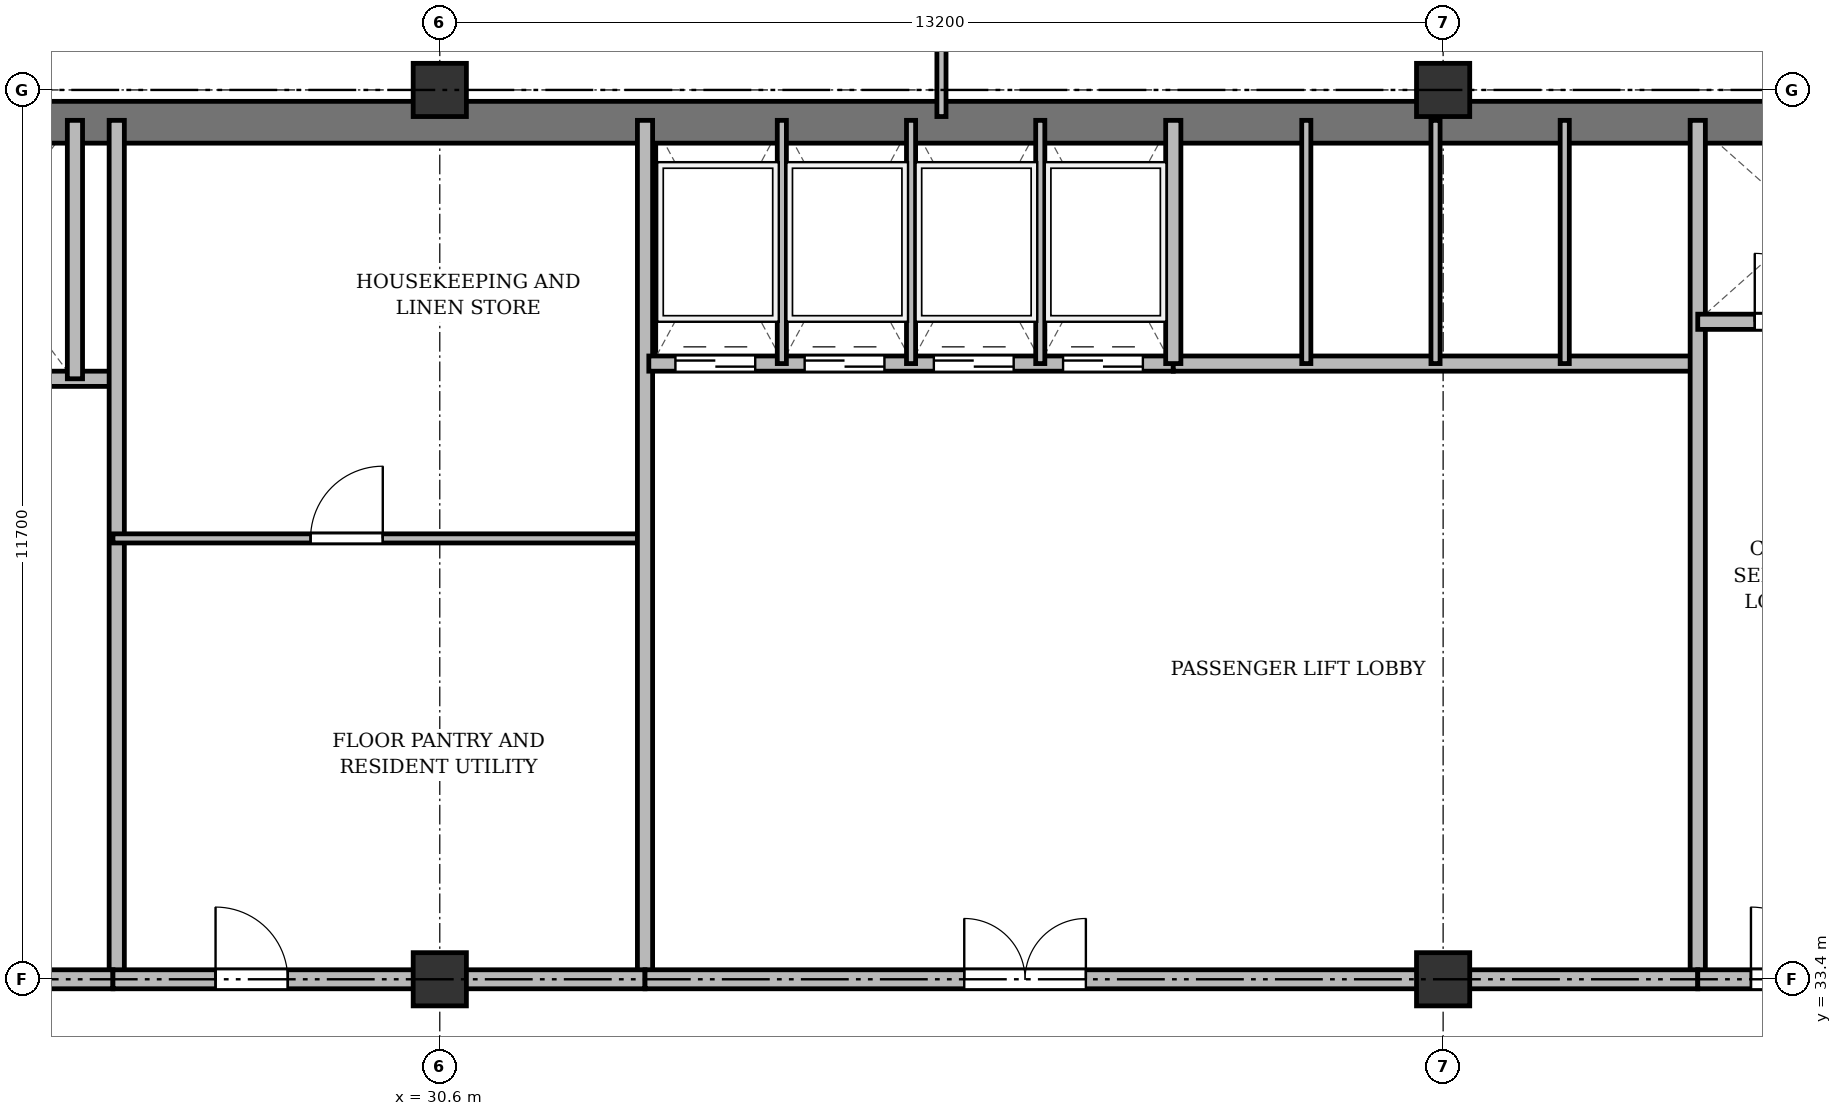
"""IFC4 building model, lengths in metres.
Left out: names, types, materials, properties, quantities, classifications, styles, units other than length and angle.
Written with IfcOpenShell. Run it as: python <this file> out.ifc"""

import sys

from ifc_helpers import new_model, si_unit, direction, frame, frame_2d, origin, origin_2d, place, context, subcontext, project, spatial, rectangle, extrude, source, transform, mapped, element, fill, save


model = new_model("IFC4")
c1 = context("Model", 3, precision=1e-05, world=origin(), true_north=direction((0.0, 1.0)))
c2 = subcontext(c1, "Body", "Model", "MODEL_VIEW")
j1 = project(units=[si_unit("LENGTHUNIT", "METRE"), si_unit("PLANEANGLEUNIT", "RADIAN")], contexts=[c1])
p1 = place(None, origin())
s1 = spatial("IfcSite", under=j1, at=p1, CompositionType="ELEMENT")
p2 = place(p1, origin())
s2 = spatial("IfcBuilding", under=s1, at=p2, CompositionType="ELEMENT")
p3 = place(p2, frame((0.0, 0.0, 153.7)))
s3 = spatial("IfcBuildingStorey", under=s2, at=p3, CompositionType="ELEMENT", Elevation=153.7)
m1 = source(origin(), c2, "Body", "SweptSolid", [
    extrude(rectangle(XDim=0.7, YDim=0.7, at=origin_2d()), origin(), (0.0, 0.0, 1.0), 3.6),
])
for number, where, z_axis, x_axis in (
    (1, (30.6, 33.4, 0.0), (0.0, 0.0, 1.0), (1.0, 0.0, 0.0)),
    (2, (30.6, 45.1, 0.0), (0.0, 0.0, 1.0), (1.0, 0.0, 0.0)),
    (3, (43.8, 33.4, 0.0), (0.0, 0.0, 1.0), (1.0, 0.0, 0.0)),
    (4, (43.8, 45.1, 0.0), (0.0, 0.0, 1.0), (1.0, 0.0, 0.0)),
):
    element("IfcColumn", number, at=place(p3, frame(where, z_axis=z_axis, x_axis=x_axis)), inside=s3, PredefinedType="COLUMN", context=c2, shape_type="MappedRepresentation", body=[
        mapped(m1, transform((0.0, 0.0, 0.0), x_axis=(1.0, 0.0, 0.0), y_axis=(0.0, 1.0, 0.0), z_axis=(0.0, 0.0, 1.0), scale=1.0)),
    ])
p4 = place(p3, frame((15.65, 44.675, 0.0), z_axis=(0.0, 0.0, 1.0), x_axis=(1.0, 0.0, 0.0)))
e5 = element("IfcWall", 5, at=p4, inside=s3, PredefinedType="SHEAR", context=c2, shape_type="SweptSolid", body=[
    extrude(rectangle(XDim=43.1, YDim=0.55, at=frame_2d((21.55, 0.0))), origin(), (0.0, 0.0, 1.0), 3.35),
])
p5 = place(p3, frame((19.55, 41.3, 0.0), z_axis=(0.0, 0.0, 1.0), x_axis=(1.0, 0.0, 0.0)))
e6 = element("IfcWall", 6, at=p5, inside=s3, PredefinedType="SOLIDWALL", context=c2, shape_type="SweptSolid", body=[
    extrude(rectangle(XDim=6.75, YDim=0.2, at=frame_2d((3.375, 0.0))), origin(), (0.0, 0.0, 1.0), 3.35),
])
p6 = place(p5, frame((1.7, 0.0, 0.0)))
e7 = element("IfcOpeningElement", 7, at=p6, cuts=e6, PredefinedType="OPENING", context=c2, shape_type="SweptSolid", body=[
    extrude(rectangle(XDim=1.1, YDim=2.15, at=frame_2d((0.55, 1.075))), frame((0.0, 0.11, 0.0), z_axis=(0.0, -1.0, 0.0), x_axis=(1.0, 0.0, 0.0)), (0.0, 0.0, 1.0), 0.22),
])
p7 = place(p5, frame((4.4, 0.0, 0.0)))
e8 = element("IfcOpeningElement", 8, at=p7, cuts=e6, PredefinedType="OPENING", context=c2, shape_type="SweptSolid", body=[
    extrude(rectangle(XDim=1.1, YDim=2.15, at=frame_2d((0.55, 1.075))), frame((0.0, 0.11, 0.0), z_axis=(0.0, -1.0, 0.0), x_axis=(1.0, 0.0, 0.0)), (0.0, 0.0, 1.0), 0.22),
])
p8 = place(p3, frame((25.8, 41.3, 0.0), z_axis=(0.0, 0.0, 1.0), x_axis=(0.0, 1.0, 0.0)))
e9 = element("IfcWall", 9, at=p8, inside=s3, PredefinedType="SOLIDWALL", context=c2, shape_type="SweptSolid", body=[
    extrude(rectangle(XDim=3.4, YDim=0.2, at=frame_2d((1.7, 0.0))), origin(), (0.0, 0.0, 1.0), 3.35),
])
p9 = place(p3, frame((26.35, 33.4, 0.0), z_axis=(0.0, 0.0, 1.0), x_axis=(0.0, 1.0, 0.0)))
e10 = element("IfcWall", 10, at=p9, inside=s3, PredefinedType="SOLIDWALL", context=c2, shape_type="SweptSolid", body=[
    extrude(rectangle(XDim=11.3, YDim=0.2, at=frame_2d((5.65, 0.0))), origin(), (0.0, 0.0, 1.0), 2.75),
])
p10 = place(p3, frame((19.5, 33.4, 0.0), z_axis=(0.0, 0.0, 1.0), x_axis=(1.0, 0.0, 0.0)))
e11 = element("IfcWall", 11, at=p10, inside=s3, PredefinedType="PARTITIONING", context=c2, shape_type="SweptSolid", body=[
    extrude(rectangle(XDim=6.8, YDim=0.25, at=frame_2d((3.4, 0.0))), origin(), (0.0, 0.0, 1.0), 2.75),
])
p11 = place(p10, frame((0.75, 0.0, 0.0)))
e12 = element("IfcOpeningElement", 12, at=p11, cuts=e11, PredefinedType="OPENING", context=c2, shape_type="SweptSolid", body=[
    extrude(rectangle(XDim=1.6, YDim=2.2, at=frame_2d((0.8, 1.1))), frame((0.0, 0.135, 0.0), z_axis=(0.0, -1.0, 0.0), x_axis=(1.0, 0.0, 0.0)), (0.0, 0.0, 1.0), 0.27),
])
p12 = place(p3, frame((26.3, 39.2, 0.0), z_axis=(0.0, 0.0, 1.0), x_axis=(1.0, 0.0, 0.0)))
e13 = element("IfcWall", 13, at=p12, inside=s3, PredefinedType="PARTITIONING", context=c2, shape_type="SweptSolid", body=[
    extrude(rectangle(XDim=7.0, YDim=0.12, at=frame_2d((3.5, 0.0))), origin(), (0.0, 0.0, 1.0), 2.85),
])
p13 = place(p12, frame((2.6, 0.0, 0.0)))
e14 = element("IfcOpeningElement", 14, at=p13, cuts=e13, PredefinedType="OPENING", context=c2, shape_type="SweptSolid", body=[
    extrude(rectangle(XDim=0.95, YDim=2.15, at=frame_2d((0.475, 1.075))), frame((0.0, 0.07, 0.0), z_axis=(0.0, -1.0, 0.0), x_axis=(1.0, 0.0, 0.0)), (0.0, 0.0, 1.0), 0.14),
])
p14 = place(p3, frame((33.3, 33.4, 0.0), z_axis=(0.0, 0.0, 1.0), x_axis=(0.0, 1.0, 0.0)))
e15 = element("IfcWall", 15, at=p14, inside=s3, PredefinedType="SOLIDWALL", context=c2, shape_type="SweptSolid", body=[
    extrude(rectangle(XDim=11.3, YDim=0.2, at=frame_2d((5.65, 0.0))), origin(), (0.0, 0.0, 1.0), 2.75),
])
p15 = place(p3, frame((33.35, 41.5, 0.0), z_axis=(0.0, 0.0, 1.0), x_axis=(1.0, 0.0, 0.0)))
e16 = element("IfcWall", 16, at=p15, inside=s3, PredefinedType="SOLIDWALL", context=c2, shape_type="SweptSolid", body=[
    extrude(rectangle(XDim=6.9, YDim=0.2, at=frame_2d((3.45, 0.0))), origin(), (0.0, 0.0, 1.0), 3.35),
])
p16 = place(p15, frame((0.35, 0.0, 0.0)))
e17 = element("IfcOpeningElement", 17, at=p16, cuts=e16, PredefinedType="OPENING", context=c2, shape_type="SweptSolid", body=[
    extrude(rectangle(XDim=1.05, YDim=2.15, at=frame_2d((0.525, 1.075))), frame((0.0, 0.11, 0.0), z_axis=(0.0, -1.0, 0.0), x_axis=(1.0, 0.0, 0.0)), (0.0, 0.0, 1.0), 0.22),
])
p17 = place(p15, frame((2.05, 0.0, 0.0)))
e18 = element("IfcOpeningElement", 18, at=p17, cuts=e16, PredefinedType="OPENING", context=c2, shape_type="SweptSolid", body=[
    extrude(rectangle(XDim=1.05, YDim=2.15, at=frame_2d((0.525, 1.075))), frame((0.0, 0.11, 0.0), z_axis=(0.0, -1.0, 0.0), x_axis=(1.0, 0.0, 0.0)), (0.0, 0.0, 1.0), 0.22),
])
p18 = place(p15, frame((3.75, 0.0, 0.0)))
e19 = element("IfcOpeningElement", 19, at=p18, cuts=e16, PredefinedType="OPENING", context=c2, shape_type="SweptSolid", body=[
    extrude(rectangle(XDim=1.05, YDim=2.15, at=frame_2d((0.525, 1.075))), frame((0.0, 0.11, 0.0), z_axis=(0.0, -1.0, 0.0), x_axis=(1.0, 0.0, 0.0)), (0.0, 0.0, 1.0), 0.22),
])
p19 = place(p15, frame((5.45, 0.0, 0.0)))
e20 = element("IfcOpeningElement", 20, at=p19, cuts=e16, PredefinedType="OPENING", context=c2, shape_type="SweptSolid", body=[
    extrude(rectangle(XDim=1.05, YDim=2.15, at=frame_2d((0.525, 1.075))), frame((0.0, 0.11, 0.0), z_axis=(0.0, -1.0, 0.0), x_axis=(1.0, 0.0, 0.0)), (0.0, 0.0, 1.0), 0.22),
])
for number, where, z_axis, x_axis in (
    (21, (35.1, 41.5, 0.0), (0.0, 0.0, 1.0), (0.0, 1.0, 0.0)),
    (22, (36.8, 41.5, 0.0), (0.0, 0.0, 1.0), (0.0, 1.0, 0.0)),
    (23, (38.5, 41.5, 0.0), (0.0, 0.0, 1.0), (0.0, 1.0, 0.0)),
):
    element("IfcWall", number, at=place(p3, frame(where, z_axis=z_axis, x_axis=x_axis)), inside=s3, PredefinedType="PARTITIONING", context=c2, shape_type="SweptSolid", body=[
        extrude(rectangle(XDim=3.2, YDim=0.12, at=frame_2d((1.6, 0.0))), origin(), (0.0, 0.0, 1.0), 3.35),
    ])
p20 = place(p3, frame((40.25, 41.5, 0.0), z_axis=(0.0, 0.0, 1.0), x_axis=(1.0, 0.0, 0.0)))
e24 = element("IfcWall", 24, at=p20, inside=s3, PredefinedType="SOLIDWALL", context=c2, shape_type="SweptSolid", body=[
    extrude(rectangle(XDim=6.9, YDim=0.2, at=frame_2d((3.45, 0.0))), origin(), (0.0, 0.0, 1.0), 2.85),
])
p21 = place(p3, frame((40.25, 41.5, 0.0), z_axis=(0.0, 0.0, 1.0), x_axis=(0.0, 1.0, 0.0)))
e25 = element("IfcWall", 25, at=p21, inside=s3, PredefinedType="SOLIDWALL", context=c2, shape_type="SweptSolid", body=[
    extrude(rectangle(XDim=3.2, YDim=0.2, at=frame_2d((1.6, 0.0))), origin(), (0.0, 0.0, 1.0), 3.35),
])
p22 = place(p3, frame((42.0, 41.5, 0.0), z_axis=(0.0, 0.0, 1.0), x_axis=(0.0, 1.0, 0.0)))
e26 = element("IfcWall", 26, at=p22, inside=s3, PredefinedType="PARTITIONING", context=c2, shape_type="SweptSolid", body=[
    extrude(rectangle(XDim=3.2, YDim=0.12, at=frame_2d((1.6, 0.0))), origin(), (0.0, 0.0, 1.0), 3.35),
])
p23 = place(p3, frame((43.7, 41.5, 0.0), z_axis=(0.0, 0.0, 1.0), x_axis=(0.0, 1.0, 0.0)))
e27 = element("IfcWall", 27, at=p23, inside=s3, PredefinedType="PARTITIONING", context=c2, shape_type="SweptSolid", body=[
    extrude(rectangle(XDim=3.2, YDim=0.12, at=frame_2d((1.6, 0.0))), origin(), (0.0, 0.0, 1.0), 2.85),
])
p24 = place(p3, frame((45.4, 41.5, 0.0), z_axis=(0.0, 0.0, 1.0), x_axis=(0.0, 1.0, 0.0)))
e28 = element("IfcWall", 28, at=p24, inside=s3, PredefinedType="PARTITIONING", context=c2, shape_type="SweptSolid", body=[
    extrude(rectangle(XDim=3.2, YDim=0.12, at=frame_2d((1.6, 0.0))), origin(), (0.0, 0.0, 1.0), 3.35),
])
p25 = place(p3, frame((47.15, 33.4, 0.0), z_axis=(0.0, 0.0, 1.0), x_axis=(0.0, 1.0, 0.0)))
e29 = element("IfcWall", 29, at=p25, inside=s3, PredefinedType="SOLIDWALL", context=c2, shape_type="SweptSolid", body=[
    extrude(rectangle(XDim=11.3, YDim=0.2, at=frame_2d((5.65, 0.0))), origin(), (0.0, 0.0, 1.0), 2.75),
])
p26 = place(p3, frame((26.3, 33.4, 0.0), z_axis=(0.0, 0.0, 1.0), x_axis=(1.0, 0.0, 0.0)))
e30 = element("IfcWall", 30, at=p26, inside=s3, PredefinedType="PARTITIONING", context=c2, shape_type="SweptSolid", body=[
    extrude(rectangle(XDim=7.0, YDim=0.25, at=frame_2d((3.5, 0.0))), origin(), (0.0, 0.0, 1.0), 2.75),
])
p27 = place(p26, frame((1.35, 0.0, 0.0)))
e31 = element("IfcOpeningElement", 31, at=p27, cuts=e30, PredefinedType="OPENING", context=c2, shape_type="SweptSolid", body=[
    extrude(rectangle(XDim=0.95, YDim=2.15, at=frame_2d((0.475, 1.075))), frame((0.0, 0.135, 0.0), z_axis=(0.0, -1.0, 0.0), x_axis=(1.0, 0.0, 0.0)), (0.0, 0.0, 1.0), 0.27),
])
p28 = place(p3, frame((33.3, 33.4, 0.0), z_axis=(0.0, 0.0, 1.0), x_axis=(1.0, 0.0, 0.0)))
e32 = element("IfcWall", 32, at=p28, inside=s3, PredefinedType="PARTITIONING", context=c2, shape_type="SweptSolid", body=[
    extrude(rectangle(XDim=13.85, YDim=0.25, at=frame_2d((6.925, 0.0))), origin(), (0.0, 0.0, 1.0), 2.75),
])
p29 = place(p28, frame((4.2, 0.0, 0.0)))
e33 = element("IfcOpeningElement", 33, at=p29, cuts=e32, PredefinedType="OPENING", context=c2, shape_type="SweptSolid", body=[
    extrude(rectangle(XDim=1.6, YDim=2.2, at=frame_2d((0.8, 1.1))), frame((0.0, 0.135, 0.0), z_axis=(0.0, -1.0, 0.0), x_axis=(1.0, 0.0, 0.0)), (0.0, 0.0, 1.0), 0.27),
])
p30 = place(p3, frame((47.15, 42.05, 0.0), z_axis=(0.0, 0.0, 1.0), x_axis=(1.0, 0.0, 0.0)))
e34 = element("IfcWall", 34, at=p30, inside=s3, PredefinedType="SOLIDWALL", context=c2, shape_type="SweptSolid", body=[
    extrude(rectangle(XDim=7.85, YDim=0.2, at=frame_2d((3.925, 0.0))), origin(), (0.0, 0.0, 1.0), 2.85),
])
p31 = place(p30, frame((0.75, 0.0, 0.0)))
e35 = element("IfcOpeningElement", 35, at=p31, cuts=e34, PredefinedType="OPENING", context=c2, shape_type="SweptSolid", body=[
    extrude(rectangle(XDim=0.9, YDim=2.1, at=frame_2d((0.45, 1.05))), frame((0.0, 0.11, 0.0), z_axis=(0.0, -1.0, 0.0), x_axis=(1.0, 0.0, 0.0)), (0.0, 0.0, 1.0), 0.22),
])
p32 = place(p30, frame((3.85, 0.0, 0.0)))
e36 = element("IfcOpeningElement", 36, at=p32, cuts=e34, PredefinedType="OPENING", context=c2, shape_type="SweptSolid", body=[
    extrude(rectangle(XDim=0.9, YDim=2.1, at=frame_2d((0.45, 1.05))), frame((0.0, 0.11, 0.0), z_axis=(0.0, -1.0, 0.0), x_axis=(1.0, 0.0, 0.0)), (0.0, 0.0, 1.0), 0.22),
])
p33 = place(p3, frame((47.15, 33.4, 0.0), z_axis=(0.0, 0.0, 1.0), x_axis=(1.0, 0.0, 0.0)))
e37 = element("IfcWall", 37, at=p33, inside=s3, PredefinedType="PARTITIONING", context=c2, shape_type="SweptSolid", body=[
    extrude(rectangle(XDim=11.15, YDim=0.25, at=frame_2d((5.575, 0.0))), origin(), (0.0, 0.0, 1.0), 2.75),
])
p34 = place(p33, frame((0.7, 0.0, 0.0)))
e38 = element("IfcOpeningElement", 38, at=p34, cuts=e37, PredefinedType="OPENING", context=c2, shape_type="SweptSolid", body=[
    extrude(rectangle(XDim=0.95, YDim=2.15, at=frame_2d((0.475, 1.075))), frame((0.0, 0.135, 0.0), z_axis=(0.0, -1.0, 0.0), x_axis=(1.0, 0.0, 0.0)), (0.0, 0.0, 1.0), 0.27),
])
p35 = place(p33, frame((6.0, 0.0, 0.0)))
e39 = element("IfcOpeningElement", 39, at=p35, cuts=e37, PredefinedType="OPENING", context=c2, shape_type="SweptSolid", body=[
    extrude(rectangle(XDim=1.2, YDim=2.15, at=frame_2d((0.6, 1.075))), frame((0.0, 0.135, 0.0), z_axis=(0.0, -1.0, 0.0), x_axis=(1.0, 0.0, 0.0)), (0.0, 0.0, 1.0), 0.27),
])
p36 = place(p3, frame((37.2, 44.75, 0.0), z_axis=(0.0, 0.0, 1.0), x_axis=(0.0, 1.0, 0.0)))
e40 = element("IfcWall", 40, at=p36, inside=s3, PredefinedType="PARTITIONING", context=c2, shape_type="SweptSolid", body=[
    extrude(rectangle(XDim=3.61, YDim=0.12, at=frame_2d((1.805, 0.0))), origin(), (0.0, 0.0, 1.0), 2.75),
])
p37 = place(p36, frame((1.1, 0.0, 0.0)))
e41 = element("IfcOpeningElement", 41, at=p37, cuts=e40, PredefinedType="OPENING", context=c2, shape_type="SweptSolid", body=[
    extrude(rectangle(XDim=0.95, YDim=2.15, at=frame_2d((0.475, 1.075))), frame((0.0, 0.07, 0.0), z_axis=(0.0, -1.0, 0.0), x_axis=(1.0, 0.0, 0.0)), (0.0, 0.0, 1.0), 0.14),
])
m2 = source(origin(), c2, "Body", "SweptSolid", [
    extrude(rectangle(XDim=0.95, YDim=2.15, at=frame_2d((0.475, 1.075))), frame((0.0, 0.025, 0.0), z_axis=(0.0, -1.0, 0.0), x_axis=(1.0, 0.0, 0.0)), (0.0, 0.0, 1.0), 0.05),
])
p38 = place(p13, origin())
e42 = element("IfcDoor", 42, at=p38, inside=s3, OperationType="SINGLE_SWING_RIGHT", PredefinedType="DOOR", context=c2, shape_type="MappedRepresentation", body=[
    mapped(m2, transform((0.0, 0.0, 0.0), x_axis=(1.0, 0.0, 0.0), y_axis=(0.0, 1.0, 0.0), z_axis=(0.0, 0.0, 1.0), scale=1.0)),
])
fill(e14, e42)
m3 = source(origin(), c2, "Body", "SweptSolid", [
    extrude(rectangle(XDim=1.05, YDim=2.15, at=frame_2d((0.525, 1.075))), frame((0.0, 0.025, 0.0), z_axis=(0.0, -1.0, 0.0), x_axis=(1.0, 0.0, 0.0)), (0.0, 0.0, 1.0), 0.05),
])
p39 = place(p16, origin())
e43 = element("IfcDoor", 43, at=p39, inside=s3, OperationType="DOUBLE_DOOR_SLIDING", PredefinedType="DOOR", context=c2, shape_type="MappedRepresentation", body=[
    mapped(m3, transform((0.0, 0.0, 0.0), x_axis=(1.0, 0.0, 0.0), y_axis=(0.0, 1.0, 0.0), z_axis=(0.0, 0.0, 1.0), scale=1.0)),
])
fill(e17, e43)
p40 = place(p17, origin())
e44 = element("IfcDoor", 44, at=p40, inside=s3, OperationType="DOUBLE_DOOR_SLIDING", PredefinedType="DOOR", context=c2, shape_type="MappedRepresentation", body=[
    mapped(m3, transform((0.0, 0.0, 0.0), x_axis=(1.0, 0.0, 0.0), y_axis=(0.0, 1.0, 0.0), z_axis=(0.0, 0.0, 1.0), scale=1.0)),
])
fill(e18, e44)
p41 = place(p18, origin())
e45 = element("IfcDoor", 45, at=p41, inside=s3, OperationType="DOUBLE_DOOR_SLIDING", PredefinedType="DOOR", context=c2, shape_type="MappedRepresentation", body=[
    mapped(m3, transform((0.0, 0.0, 0.0), x_axis=(1.0, 0.0, 0.0), y_axis=(0.0, 1.0, 0.0), z_axis=(0.0, 0.0, 1.0), scale=1.0)),
])
fill(e19, e45)
p42 = place(p19, origin())
e46 = element("IfcDoor", 46, at=p42, inside=s3, OperationType="DOUBLE_DOOR_SLIDING", PredefinedType="DOOR", context=c2, shape_type="MappedRepresentation", body=[
    mapped(m3, transform((0.0, 0.0, 0.0), x_axis=(1.0, 0.0, 0.0), y_axis=(0.0, 1.0, 0.0), z_axis=(0.0, 0.0, 1.0), scale=1.0)),
])
fill(e20, e46)
p43 = place(p27, origin())
e47 = element("IfcDoor", 47, at=p43, inside=s3, OperationType="SINGLE_SWING_LEFT", PredefinedType="DOOR", context=c2, shape_type="MappedRepresentation", body=[
    mapped(m2, transform((0.0, 0.0, 0.0), x_axis=(1.0, 0.0, 0.0), y_axis=(0.0, 1.0, 0.0), z_axis=(0.0, 0.0, 1.0), scale=1.0)),
])
fill(e31, e47)
m4 = source(origin(), c2, "Body", "SweptSolid", [
    extrude(rectangle(XDim=1.6, YDim=2.2, at=frame_2d((0.8, 1.1))), frame((0.0, 0.025, 0.0), z_axis=(0.0, -1.0, 0.0), x_axis=(1.0, 0.0, 0.0)), (0.0, 0.0, 1.0), 0.05),
])
p44 = place(p29, origin())
e48 = element("IfcDoor", 48, at=p44, inside=s3, OperationType="DOUBLE_DOOR_SINGLE_SWING", PredefinedType="DOOR", context=c2, shape_type="MappedRepresentation", body=[
    mapped(m4, transform((0.0, 0.0, 0.0), x_axis=(1.0, 0.0, 0.0), y_axis=(0.0, 1.0, 0.0), z_axis=(0.0, 0.0, 1.0), scale=1.0)),
])
fill(e33, e48)
m5 = source(origin(), c2, "Body", "SweptSolid", [
    extrude(rectangle(XDim=0.9, YDim=2.1, at=frame_2d((0.45, 1.05))), frame((0.0, 0.025, 0.0), z_axis=(0.0, -1.0, 0.0), x_axis=(1.0, 0.0, 0.0)), (0.0, 0.0, 1.0), 0.05),
])
p45 = place(p31, origin())
e49 = element("IfcDoor", 49, at=p45, inside=s3, OperationType="SINGLE_SWING_LEFT", PredefinedType="DOOR", context=c2, shape_type="MappedRepresentation", body=[
    mapped(m5, transform((0.0, 0.0, 0.0), x_axis=(1.0, 0.0, 0.0), y_axis=(0.0, 1.0, 0.0), z_axis=(0.0, 0.0, 1.0), scale=1.0)),
])
fill(e35, e49)
p46 = place(p34, origin())
e50 = element("IfcDoor", 50, at=p46, inside=s3, OperationType="SINGLE_SWING_LEFT", PredefinedType="DOOR", context=c2, shape_type="MappedRepresentation", body=[
    mapped(m2, transform((0.0, 0.0, 0.0), x_axis=(1.0, 0.0, 0.0), y_axis=(0.0, 1.0, 0.0), z_axis=(0.0, 0.0, 1.0), scale=1.0)),
])
fill(e38, e50)
save(model, sys.argv[1])
